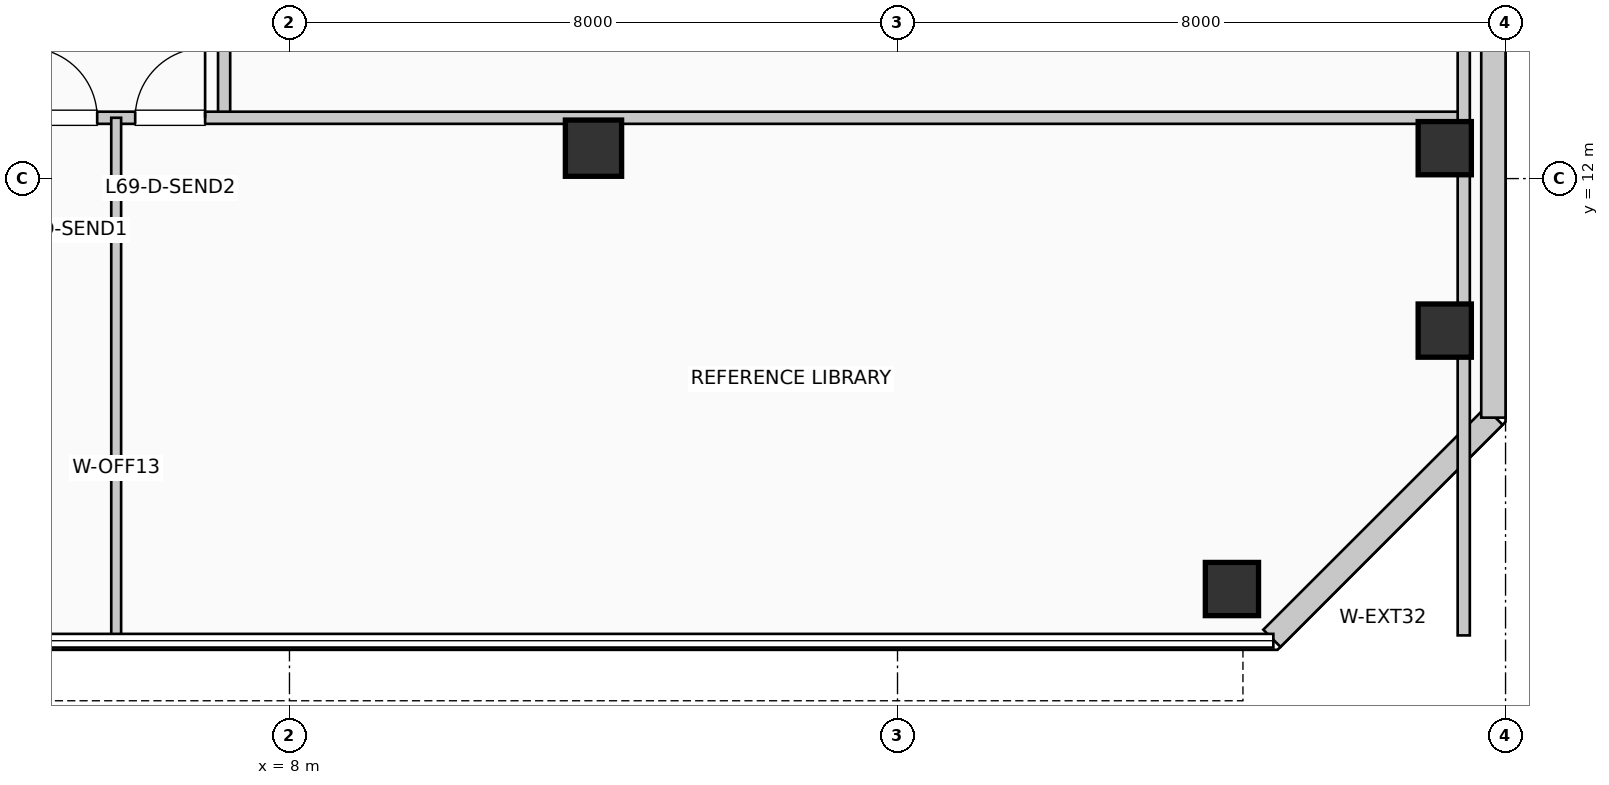
"""IFC4 building model, lengths in metres.
Left out: names, types, materials, properties, quantities, classifications, styles, units other than length and angle.
Written with IfcOpenShell. Run it as: python <this file> out.ifc"""

import sys

from ifc_helpers import new_model, si_unit, direction, frame, frame_2d, origin, origin_2d, place, context, subcontext, project, spatial, rectangle, extrude, element, fill, save


model = new_model("IFC4")
c1 = context("Model", 3, precision=1e-05, world=origin(), true_north=direction((0.0, 1.0)))
c2 = subcontext(c1, "Body", "Model", "MODEL_VIEW")
j1 = project(units=[si_unit("LENGTHUNIT", "METRE"), si_unit("PLANEANGLEUNIT", "RADIAN")], contexts=[c1])
p1 = place(None, origin())
s1 = spatial("IfcSite", under=j1, at=p1, CompositionType="ELEMENT")
p2 = place(p1, origin())
s2 = spatial("IfcBuilding", under=s1, at=p2, CompositionType="ELEMENT")
p3 = place(p2, frame((0.0, 0.0, 284.13)))
s3 = spatial("IfcBuildingStorey", under=s2, at=p3, CompositionType="ELEMENT", Elevation=284.13)
p4 = place(p3, frame((12.0, 12.4, 0.0), z_axis=(0.0, 0.0, 1.0), x_axis=(1.0, 0.0, 0.0)))
e1 = element("IfcColumn", 1, at=p4, inside=s3, PredefinedType="COLUMN", context=c2, shape_type="SweptSolid", body=[
    extrude(rectangle(XDim=0.74, YDim=0.74, at=origin_2d()), origin(), (0.0, 0.0, 1.0), 3.96),
])
for number, where, z_axis, x_axis in (
    (2, (20.4, 6.6, 0.0), (0.0, 0.0, 1.0), (1.0, 0.0, 0.0)),
    (3, (23.2, 10.0, 0.0), (0.0, 0.0, 1.0), (1.0, 0.0, 0.0)),
    (4, (23.2, 12.4, 0.0), (0.0, 0.0, 1.0), (1.0, 0.0, 0.0)),
):
    element("IfcColumn", number, at=place(p3, frame(where, z_axis=z_axis, x_axis=x_axis)), inside=s3, PredefinedType="COLUMN", context=c2, shape_type="SweptSolid", body=[
        extrude(rectangle(XDim=0.7, YDim=0.7, at=origin_2d()), origin(), (0.0, 0.0, 1.0), 3.96),
    ])
p5 = place(p3, frame((20.926, 5.952, 0.0), z_axis=(0.0, 0.0, 1.0), x_axis=(0.707077242712, 0.707136318428, 0.0)))
e5 = element("IfcWall", 5, at=p5, inside=s3, PredefinedType="SOLIDWALL", context=c2, shape_type="SweptSolid", body=[
    extrude(rectangle(XDim=4.133, YDim=0.32, at=frame_2d((2.066, 0.0))), origin(), (0.0, 0.0, 1.0), 3.74),
])
p6 = place(p3, frame((23.84, 8.855, 0.0), z_axis=(0.0, 0.0, 1.0), x_axis=(0.0, 1.0, 0.0)))
e6 = element("IfcWall", 6, at=p6, inside=s3, PredefinedType="SOLIDWALL", context=c2, shape_type="SweptSolid", body=[
    extrude(rectangle(XDim=14.09, YDim=0.32, at=frame_2d((7.045, 0.0))), origin(), (0.0, 0.0, 1.0), 3.74),
])
p7 = place(p3, frame((7.14, 12.8, 0.0), z_axis=(0.0, 0.0, 1.0), x_axis=(0.0, 1.0, 0.0)))
e7 = element("IfcWall", 7, at=p7, inside=s3, PredefinedType="PARTITIONING", context=c2, shape_type="SweptSolid", body=[
    extrude(rectangle(XDim=16.6, YDim=0.16, at=frame_2d((8.3, 0.0))), origin(), (0.0, 0.0, 1.0), 3.74),
])
p8 = place(p7, frame((1.849, 0.0, 0.0)))
e8 = element("IfcOpeningElement", 8, at=p8, cuts=e7, PredefinedType="OPENING", context=c2, shape_type="SweptSolid", body=[
    extrude(rectangle(XDim=0.95, YDim=2.15, at=frame_2d((0.475, 1.075))), frame((0.0, 0.09, 0.0), z_axis=(0.0, -1.0, 0.0), x_axis=(1.0, 0.0, 0.0)), (0.0, 0.0, 1.0), 0.18),
])
p9 = place(p7, frame((6.829, 0.0, 0.0)))
e9 = element("IfcOpeningElement", 9, at=p9, cuts=e7, PredefinedType="OPENING", context=c2, shape_type="SweptSolid", body=[
    extrude(rectangle(XDim=0.95, YDim=2.15, at=frame_2d((0.475, 1.075))), frame((0.0, 0.09, 0.0), z_axis=(0.0, -1.0, 0.0), x_axis=(1.0, 0.0, 0.0)), (0.0, 0.0, 1.0), 0.18),
])
p10 = place(p7, frame((12.805, 0.0, 0.0)))
e10 = element("IfcOpeningElement", 10, at=p10, cuts=e7, PredefinedType="OPENING", context=c2, shape_type="SweptSolid", body=[
    extrude(rectangle(XDim=0.95, YDim=2.15, at=frame_2d((0.475, 1.075))), frame((0.0, 0.09, 0.0), z_axis=(0.0, -1.0, 0.0), x_axis=(1.0, 0.0, 0.0)), (0.0, 0.0, 1.0), 0.18),
])
p11 = place(p3, frame((0.19, 12.8, 0.0), z_axis=(0.0, 0.0, 1.0), x_axis=(1.0, 0.0, 0.0)))
e11 = element("IfcWall", 11, at=p11, inside=s3, PredefinedType="PARTITIONING", context=c2, shape_type="SweptSolid", body=[
    extrude(rectangle(XDim=23.26, YDim=0.16, at=frame_2d((11.63, 0.0))), origin(), (0.0, 0.0, 1.0), 3.175),
])
p12 = place(p11, frame((4.36, 0.0, 0.0)))
e12 = element("IfcOpeningElement", 12, at=p12, cuts=e11, PredefinedType="OPENING", context=c2, shape_type="SweptSolid", body=[
    extrude(rectangle(XDim=0.92, YDim=2.1, at=frame_2d((0.46, 1.05))), frame((0.0, 0.09, 0.0), z_axis=(0.0, -1.0, 0.0), x_axis=(1.0, 0.0, 0.0)), (0.0, 0.0, 1.0), 0.18),
])
p13 = place(p11, frame((5.78, 0.0, 0.0)))
e13 = element("IfcOpeningElement", 13, at=p13, cuts=e11, PredefinedType="OPENING", context=c2, shape_type="SweptSolid", body=[
    extrude(rectangle(XDim=0.92, YDim=2.1, at=frame_2d((0.46, 1.05))), frame((0.0, 0.09, 0.0), z_axis=(0.0, -1.0, 0.0), x_axis=(1.0, 0.0, 0.0)), (0.0, 0.0, 1.0), 0.18),
])
p14 = place(p3, frame((23.45, 5.99, 0.0), z_axis=(0.0, 0.0, 1.0), x_axis=(0.0, 1.0, 0.0)))
e14 = element("IfcWall", 14, at=p14, inside=s3, PredefinedType="PARTITIONING", context=c2, shape_type="SweptSolid", body=[
    extrude(rectangle(XDim=23.41, YDim=0.16, at=frame_2d((11.705, 0.0))), origin(), (0.0, 0.0, 1.0), 3.175),
])
p15 = place(p3, frame((5.72, 5.99, 0.0), z_axis=(0.0, 0.0, 1.0), x_axis=(0.0, 1.0, 0.0)))
e15 = element("IfcWall", 15, at=p15, inside=s3, PredefinedType="PARTITIONING", context=c2, shape_type="SweptSolid", body=[
    extrude(rectangle(XDim=6.81, YDim=0.13, at=frame_2d((3.405, 0.0))), origin(), (0.0, 0.0, 1.0), 3.74),
])
p16 = place(p12, origin())
e16 = element("IfcDoor", 16, at=p16, inside=s3, OperationType="SINGLE_SWING_LEFT", PredefinedType="DOOR", context=c2, shape_type="SweptSolid", body=[
    extrude(rectangle(XDim=0.92, YDim=2.1, at=frame_2d((0.46, 1.05))), frame((0.0, 0.025, 0.0), z_axis=(0.0, -1.0, 0.0), x_axis=(1.0, 0.0, 0.0)), (0.0, 0.0, 1.0), 0.05),
])
fill(e12, e16)
p17 = place(p13, origin())
e17 = element("IfcDoor", 17, at=p17, inside=s3, OperationType="SINGLE_SWING_RIGHT", PredefinedType="DOOR", context=c2, shape_type="SweptSolid", body=[
    extrude(rectangle(XDim=0.92, YDim=2.1, at=frame_2d((0.46, 1.05))), frame((0.0, 0.025, 0.0), z_axis=(0.0, -1.0, 0.0), x_axis=(1.0, 0.0, 0.0)), (0.0, 0.0, 1.0), 0.05),
])
fill(e13, e17)
save(model, sys.argv[1])
